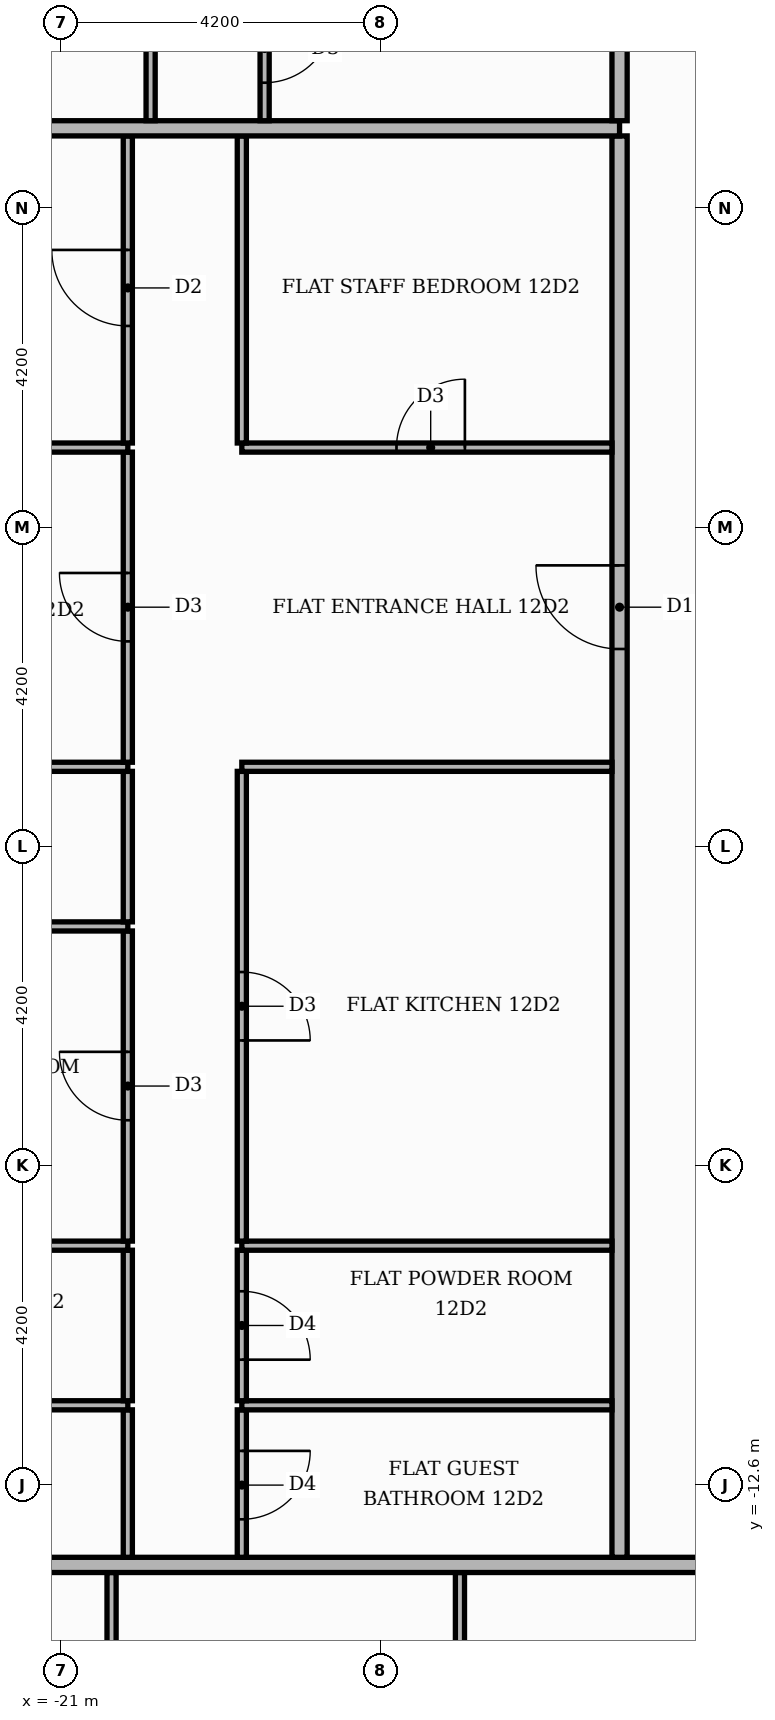
"""IFC4 building model, lengths in metres.
Left out: names, types, materials, properties, quantities, classifications, styles, units other than length and angle.
Written with IfcOpenShell. Run it as: python <this file> out.ifc"""

import sys

from ifc_helpers import new_model, si_unit, direction, frame, frame_2d, origin, place, context, subcontext, project, spatial, rectangle, extrude, element, fill, save


model = new_model("IFC4")
c1 = context("Model", 3, precision=1e-05, world=origin(), true_north=direction((0.0, 1.0)))
c2 = subcontext(c1, "Body", "Model", "MODEL_VIEW")
j1 = project(units=[si_unit("LENGTHUNIT", "METRE"), si_unit("PLANEANGLEUNIT", "RADIAN")], contexts=[c1])
p1 = place(None, origin())
s1 = spatial("IfcSite", under=j1, at=p1, CompositionType="ELEMENT")
p2 = place(p1, origin())
s2 = spatial("IfcBuilding", under=s1, at=p2, CompositionType="ELEMENT")
p3 = place(p2, frame((0.0, 0.0, 54.3)))
s3 = spatial("IfcBuildingStorey", under=s2, at=p3, CompositionType="ELEMENT", Elevation=54.3)
p4 = place(p3, frame((-20.334, -20.66, 0.0), z_axis=(0.0, 0.0, 1.0), x_axis=(0.0, 1.0, 0.0)))
e1 = element("IfcWall", 1, at=p4, inside=s3, PredefinedType="PARTITIONING", context=c2, shape_type="SweptSolid", body=[
    extrude(rectangle(XDim=6.91, YDim=0.12, at=frame_2d((3.455, 0.0))), origin(), (0.0, 0.0, 1.0), 3.48),
])
p5 = place(p4, frame((4.792, 0.0, 0.0)))
e2 = element("IfcOpeningElement", 2, at=p5, cuts=e1, PredefinedType="OPENING", context=c2, shape_type="SweptSolid", body=[
    extrude(rectangle(XDim=0.9, YDim=2.1, at=frame_2d((0.45, 1.05))), frame((0.0, 0.07, 0.0), z_axis=(0.0, -1.0, 0.0), x_axis=(1.0, 0.0, 0.0)), (0.0, 0.0, 1.0), 0.14),
])
p6 = place(p3, frame((-15.75, -20.66, 0.0), z_axis=(0.0, 0.0, 1.0), x_axis=(0.0, 1.0, 0.0)))
e3 = element("IfcWall", 3, at=p6, inside=s3, PredefinedType="PARTITIONING", context=c2, shape_type="SweptSolid", body=[
    extrude(rectangle(XDim=6.91, YDim=0.12, at=frame_2d((3.455, 0.0))), origin(), (0.0, 0.0, 1.0), 3.48),
])
p7 = place(p6, frame((2.975, 0.0, 0.0)))
e4 = element("IfcOpeningElement", 4, at=p7, cuts=e3, PredefinedType="OPENING", context=c2, shape_type="SweptSolid", body=[
    extrude(rectangle(XDim=1.0, YDim=2.1, at=frame_2d((0.5, 1.05))), frame((0.0, 0.07, 0.0), z_axis=(0.0, -1.0, 0.0), x_axis=(1.0, 0.0, 0.0)), (0.0, 0.0, 1.0), 0.14),
])
p8 = place(p3, frame((-25.42, -13.65, 0.0), z_axis=(0.0, 0.0, 1.0), x_axis=(1.0, 0.0, 0.0)))
e5 = element("IfcWall", 5, at=p8, inside=s3, PredefinedType="PARTITIONING", context=c2, shape_type="SweptSolid", body=[
    extrude(rectangle(XDim=39.07, YDim=0.2, at=frame_2d((19.535, 0.0))), origin(), (0.0, 0.0, 1.0), 3.48),
])
p9 = place(p8, frame((13.32, 0.0, 0.0)))
e6 = element("IfcOpeningElement", 6, at=p9, cuts=e5, PredefinedType="OPENING", context=c2, shape_type="SweptSolid", body=[
    extrude(rectangle(XDim=1.1, YDim=2.4, at=frame_2d((0.55, 1.2))), frame((0.0, 0.11, 0.0), z_axis=(0.0, -1.0, 0.0), x_axis=(1.0, 0.0, 0.0)), (0.0, 0.0, 1.0), 0.22),
])
p10 = place(p8, frame((25.92, 0.0, 0.0)))
e7 = element("IfcOpeningElement", 7, at=p10, cuts=e5, PredefinedType="OPENING", context=c2, shape_type="SweptSolid", body=[
    extrude(rectangle(XDim=1.1, YDim=2.4, at=frame_2d((0.55, 1.2))), frame((0.0, 0.11, 0.0), z_axis=(0.0, -1.0, 0.0), x_axis=(1.0, 0.0, 0.0)), (0.0, 0.0, 1.0), 0.22),
])
p11 = place(p3, frame((-20.12, -13.55, 0.0), z_axis=(0.0, 0.0, 1.0), x_axis=(0.0, 1.0, 0.0)))
e8 = element("IfcWall", 8, at=p11, inside=s3, PredefinedType="PARTITIONING", context=c2, shape_type="SweptSolid", body=[
    extrude(rectangle(XDim=1.94, YDim=0.12, at=frame_2d((0.97, 0.0))), origin(), (0.0, 0.0, 1.0), 3.48),
])
p12 = place(p3, frame((-18.62, -13.55, 0.0), z_axis=(0.0, 0.0, 1.0), x_axis=(0.0, 1.0, 0.0)))
e9 = element("IfcWall", 9, at=p12, inside=s3, PredefinedType="PARTITIONING", context=c2, shape_type="SweptSolid", body=[
    extrude(rectangle(XDim=1.94, YDim=0.12, at=frame_2d((0.97, 0.0))), origin(), (0.0, 0.0, 1.0), 3.48),
])
p13 = place(p12, frame((0.5, 0.0, 0.0)))
e10 = element("IfcOpeningElement", 10, at=p13, cuts=e9, PredefinedType="OPENING", context=c2, shape_type="SweptSolid", body=[
    extrude(rectangle(XDim=0.9, YDim=2.1, at=frame_2d((0.45, 1.05))), frame((0.0, 0.07, 0.0), z_axis=(0.0, -1.0, 0.0), x_axis=(1.0, 0.0, 0.0)), (0.0, 0.0, 1.0), 0.14),
])
p14 = place(p3, frame((-13.65, -13.55, 0.0), z_axis=(0.0, 0.0, 1.0), x_axis=(0.0, 1.0, 0.0)))
e11 = element("IfcWall", 11, at=p14, inside=s3, PredefinedType="PARTITIONING", context=c2, shape_type="SweptSolid", body=[
    extrude(rectangle(XDim=18.7, YDim=0.2, at=frame_2d((9.35, 0.0))), origin(), (0.0, 0.0, 1.0), 3.48),
])
p15 = place(p14, frame((11.95, 0.0, 0.0)))
e12 = element("IfcOpeningElement", 12, at=p15, cuts=e11, PredefinedType="OPENING", context=c2, shape_type="SweptSolid", body=[
    extrude(rectangle(XDim=1.1, YDim=2.4, at=frame_2d((0.55, 1.2))), frame((0.0, 0.11, 0.0), z_axis=(0.0, -1.0, 0.0), x_axis=(1.0, 0.0, 0.0)), (0.0, 0.0, 1.0), 0.22),
])
p16 = place(p3, frame((-25.42, -11.55, 0.0), z_axis=(0.0, 0.0, 1.0), x_axis=(1.0, 0.0, 0.0)))
e13 = element("IfcWall", 13, at=p16, inside=s3, PredefinedType="PARTITIONING", context=c2, shape_type="SweptSolid", body=[
    extrude(rectangle(XDim=5.3, YDim=0.12, at=frame_2d((2.65, 0.0))), origin(), (0.0, 0.0, 1.0), 3.48),
])
p17 = place(p16, frame((2.05, 0.0, 0.0)))
e14 = element("IfcOpeningElement", 14, at=p17, cuts=e13, PredefinedType="OPENING", context=c2, shape_type="SweptSolid", body=[
    extrude(rectangle(XDim=0.9, YDim=2.1, at=frame_2d((0.45, 1.05))), frame((0.0, 0.07, 0.0), z_axis=(0.0, -1.0, 0.0), x_axis=(1.0, 0.0, 0.0)), (0.0, 0.0, 1.0), 0.14),
])
p18 = place(p3, frame((-18.62, -11.55, 0.0), z_axis=(0.0, 0.0, 1.0), x_axis=(1.0, 0.0, 0.0)))
e15 = element("IfcWall", 15, at=p18, inside=s3, PredefinedType="PARTITIONING", context=c2, shape_type="SweptSolid", body=[
    extrude(rectangle(XDim=4.87, YDim=0.12, at=frame_2d((2.435, 0.0))), origin(), (0.0, 0.0, 1.0), 3.48),
])
p19 = place(p3, frame((-20.12, -11.49, 0.0), z_axis=(0.0, 0.0, 1.0), x_axis=(0.0, 1.0, 0.0)))
e16 = element("IfcWall", 16, at=p19, inside=s3, PredefinedType="PARTITIONING", context=c2, shape_type="SweptSolid", body=[
    extrude(rectangle(XDim=1.98, YDim=0.12, at=frame_2d((0.99, 0.0))), origin(), (0.0, 0.0, 1.0), 3.48),
])
p20 = place(p3, frame((-18.62, -11.49, 0.0), z_axis=(0.0, 0.0, 1.0), x_axis=(0.0, 1.0, 0.0)))
e17 = element("IfcWall", 17, at=p20, inside=s3, PredefinedType="PARTITIONING", context=c2, shape_type="SweptSolid", body=[
    extrude(rectangle(XDim=1.98, YDim=0.12, at=frame_2d((0.99, 0.0))), origin(), (0.0, 0.0, 1.0), 3.48),
])
p21 = place(p20, frame((0.54, 0.0, 0.0)))
e18 = element("IfcOpeningElement", 18, at=p21, cuts=e17, PredefinedType="OPENING", context=c2, shape_type="SweptSolid", body=[
    extrude(rectangle(XDim=0.9, YDim=2.1, at=frame_2d((0.45, 1.05))), frame((0.0, 0.07, 0.0), z_axis=(0.0, -1.0, 0.0), x_axis=(1.0, 0.0, 0.0)), (0.0, 0.0, 1.0), 0.14),
])
p22 = place(p3, frame((-25.42, -9.45, 0.0), z_axis=(0.0, 0.0, 1.0), x_axis=(1.0, 0.0, 0.0)))
e19 = element("IfcWall", 19, at=p22, inside=s3, PredefinedType="PARTITIONING", context=c2, shape_type="SweptSolid", body=[
    extrude(rectangle(XDim=5.3, YDim=0.12, at=frame_2d((2.65, 0.0))), origin(), (0.0, 0.0, 1.0), 3.48),
])
p23 = place(p22, frame((2.05, 0.0, 0.0)))
e20 = element("IfcOpeningElement", 20, at=p23, cuts=e19, PredefinedType="OPENING", context=c2, shape_type="SweptSolid", body=[
    extrude(rectangle(XDim=0.9, YDim=2.1, at=frame_2d((0.45, 1.05))), frame((0.0, 0.07, 0.0), z_axis=(0.0, -1.0, 0.0), x_axis=(1.0, 0.0, 0.0)), (0.0, 0.0, 1.0), 0.14),
])
p24 = place(p3, frame((-18.62, -9.45, 0.0), z_axis=(0.0, 0.0, 1.0), x_axis=(1.0, 0.0, 0.0)))
e21 = element("IfcWall", 21, at=p24, inside=s3, PredefinedType="PARTITIONING", context=c2, shape_type="SweptSolid", body=[
    extrude(rectangle(XDim=4.87, YDim=0.12, at=frame_2d((2.435, 0.0))), origin(), (0.0, 0.0, 1.0), 3.48),
])
p25 = place(p3, frame((-20.12, -9.39, 0.0), z_axis=(0.0, 0.0, 1.0), x_axis=(0.0, 1.0, 0.0)))
e22 = element("IfcWall", 22, at=p25, inside=s3, PredefinedType="PARTITIONING", context=c2, shape_type="SweptSolid", body=[
    extrude(rectangle(XDim=4.08, YDim=0.12, at=frame_2d((2.04, 0.0))), origin(), (0.0, 0.0, 1.0), 3.48),
])
p26 = place(p25, frame((1.59, 0.0, 0.0)))
e23 = element("IfcOpeningElement", 23, at=p26, cuts=e22, PredefinedType="OPENING", context=c2, shape_type="SweptSolid", body=[
    extrude(rectangle(XDim=0.9, YDim=2.1, at=frame_2d((0.45, 1.05))), frame((0.0, 0.07, 0.0), z_axis=(0.0, -1.0, 0.0), x_axis=(1.0, 0.0, 0.0)), (0.0, 0.0, 1.0), 0.14),
])
p27 = place(p3, frame((-18.62, -9.39, 0.0), z_axis=(0.0, 0.0, 1.0), x_axis=(0.0, 1.0, 0.0)))
e24 = element("IfcWall", 24, at=p27, inside=s3, PredefinedType="PARTITIONING", context=c2, shape_type="SweptSolid", body=[
    extrude(rectangle(XDim=6.18, YDim=0.12, at=frame_2d((3.09, 0.0))), origin(), (0.0, 0.0, 1.0), 3.48),
])
p28 = place(p27, frame((2.64, 0.0, 0.0)))
e25 = element("IfcOpeningElement", 25, at=p28, cuts=e24, PredefinedType="OPENING", context=c2, shape_type="SweptSolid", body=[
    extrude(rectangle(XDim=0.9, YDim=2.1, at=frame_2d((0.45, 1.05))), frame((0.0, 0.07, 0.0), z_axis=(0.0, -1.0, 0.0), x_axis=(1.0, 0.0, 0.0)), (0.0, 0.0, 1.0), 0.14),
])
p29 = place(p3, frame((-25.42, -5.25, 0.0), z_axis=(0.0, 0.0, 1.0), x_axis=(1.0, 0.0, 0.0)))
e26 = element("IfcWall", 26, at=p29, inside=s3, PredefinedType="PARTITIONING", context=c2, shape_type="SweptSolid", body=[
    extrude(rectangle(XDim=5.3, YDim=0.12, at=frame_2d((2.65, 0.0))), origin(), (0.0, 0.0, 1.0), 3.48),
])
p30 = place(p3, frame((-20.12, -5.19, 0.0), z_axis=(0.0, 0.0, 1.0), x_axis=(0.0, 1.0, 0.0)))
e27 = element("IfcWall", 27, at=p30, inside=s3, PredefinedType="PARTITIONING", context=c2, shape_type="SweptSolid", body=[
    extrude(rectangle(XDim=1.98, YDim=0.12, at=frame_2d((0.99, 0.0))), origin(), (0.0, 0.0, 1.0), 3.48),
])
p31 = place(p3, frame((-25.42, -3.15, 0.0), z_axis=(0.0, 0.0, 1.0), x_axis=(1.0, 0.0, 0.0)))
e28 = element("IfcWall", 28, at=p31, inside=s3, PredefinedType="PARTITIONING", context=c2, shape_type="SweptSolid", body=[
    extrude(rectangle(XDim=5.3, YDim=0.12, at=frame_2d((2.65, 0.0))), origin(), (0.0, 0.0, 1.0), 3.48),
])
p32 = place(p31, frame((2.05, 0.0, 0.0)))
e29 = element("IfcOpeningElement", 29, at=p32, cuts=e28, PredefinedType="OPENING", context=c2, shape_type="SweptSolid", body=[
    extrude(rectangle(XDim=0.9, YDim=2.1, at=frame_2d((0.45, 1.05))), frame((0.0, 0.07, 0.0), z_axis=(0.0, -1.0, 0.0), x_axis=(1.0, 0.0, 0.0)), (0.0, 0.0, 1.0), 0.14),
])
p33 = place(p3, frame((-18.62, -3.15, 0.0), z_axis=(0.0, 0.0, 1.0), x_axis=(1.0, 0.0, 0.0)))
e30 = element("IfcWall", 30, at=p33, inside=s3, PredefinedType="PARTITIONING", context=c2, shape_type="SweptSolid", body=[
    extrude(rectangle(XDim=4.87, YDim=0.12, at=frame_2d((2.435, 0.0))), origin(), (0.0, 0.0, 1.0), 3.48),
])
p34 = place(p3, frame((-20.12, -3.09, 0.0), z_axis=(0.0, 0.0, 1.0), x_axis=(0.0, 1.0, 0.0)))
e31 = element("IfcWall", 31, at=p34, inside=s3, PredefinedType="PARTITIONING", context=c2, shape_type="SweptSolid", body=[
    extrude(rectangle(XDim=4.08, YDim=0.12, at=frame_2d((2.04, 0.0))), origin(), (0.0, 0.0, 1.0), 3.48),
])
p35 = place(p34, frame((1.59, 0.0, 0.0)))
e32 = element("IfcOpeningElement", 32, at=p35, cuts=e31, PredefinedType="OPENING", context=c2, shape_type="SweptSolid", body=[
    extrude(rectangle(XDim=0.9, YDim=2.1, at=frame_2d((0.45, 1.05))), frame((0.0, 0.07, 0.0), z_axis=(0.0, -1.0, 0.0), x_axis=(1.0, 0.0, 0.0)), (0.0, 0.0, 1.0), 0.14),
])
p36 = place(p3, frame((-25.42, 1.05, 0.0), z_axis=(0.0, 0.0, 1.0), x_axis=(1.0, 0.0, 0.0)))
e33 = element("IfcWall", 33, at=p36, inside=s3, PredefinedType="PARTITIONING", context=c2, shape_type="SweptSolid", body=[
    extrude(rectangle(XDim=5.3, YDim=0.12, at=frame_2d((2.65, 0.0))), origin(), (0.0, 0.0, 1.0), 3.48),
])
p37 = place(p3, frame((-18.62, 1.05, 0.0), z_axis=(0.0, 0.0, 1.0), x_axis=(1.0, 0.0, 0.0)))
e34 = element("IfcWall", 34, at=p37, inside=s3, PredefinedType="PARTITIONING", context=c2, shape_type="SweptSolid", body=[
    extrude(rectangle(XDim=4.87, YDim=0.12, at=frame_2d((2.435, 0.0))), origin(), (0.0, 0.0, 1.0), 3.48),
])
p38 = place(p37, frame((2.035, 0.0, 0.0)))
e35 = element("IfcOpeningElement", 35, at=p38, cuts=e34, PredefinedType="OPENING", context=c2, shape_type="SweptSolid", body=[
    extrude(rectangle(XDim=0.9, YDim=2.1, at=frame_2d((0.45, 1.05))), frame((0.0, 0.07, 0.0), z_axis=(0.0, -1.0, 0.0), x_axis=(1.0, 0.0, 0.0)), (0.0, 0.0, 1.0), 0.14),
])
p39 = place(p3, frame((-20.12, 1.11, 0.0), z_axis=(0.0, 0.0, 1.0), x_axis=(0.0, 1.0, 0.0)))
e36 = element("IfcWall", 36, at=p39, inside=s3, PredefinedType="PARTITIONING", context=c2, shape_type="SweptSolid", body=[
    extrude(rectangle(XDim=4.04, YDim=0.12, at=frame_2d((2.02, 0.0))), origin(), (0.0, 0.0, 1.0), 3.48),
])
p40 = place(p39, frame((1.54, 0.0, 0.0)))
e37 = element("IfcOpeningElement", 37, at=p40, cuts=e36, PredefinedType="OPENING", context=c2, shape_type="SweptSolid", body=[
    extrude(rectangle(XDim=1.0, YDim=2.1, at=frame_2d((0.5, 1.05))), frame((0.0, 0.07, 0.0), z_axis=(0.0, -1.0, 0.0), x_axis=(1.0, 0.0, 0.0)), (0.0, 0.0, 1.0), 0.14),
])
p41 = place(p3, frame((-18.62, 1.11, 0.0), z_axis=(0.0, 0.0, 1.0), x_axis=(0.0, 1.0, 0.0)))
e38 = element("IfcWall", 38, at=p41, inside=s3, PredefinedType="PARTITIONING", context=c2, shape_type="SweptSolid", body=[
    extrude(rectangle(XDim=4.04, YDim=0.12, at=frame_2d((2.02, 0.0))), origin(), (0.0, 0.0, 1.0), 3.48),
])
p42 = place(p3, frame((-25.42, 5.25, 0.0), z_axis=(0.0, 0.0, 1.0), x_axis=(1.0, 0.0, 0.0)))
e39 = element("IfcWall", 39, at=p42, inside=s3, PredefinedType="PARTITIONING", context=c2, shape_type="SweptSolid", body=[
    extrude(rectangle(XDim=11.77, YDim=0.2, at=frame_2d((5.885, 0.0))), origin(), (0.0, 0.0, 1.0), 3.48),
])
p43 = place(p3, frame((-19.82, 5.35, 0.0), z_axis=(0.0, 0.0, 1.0), x_axis=(0.0, 1.0, 0.0)))
e40 = element("IfcWall", 40, at=p43, inside=s3, PredefinedType="PARTITIONING", context=c2, shape_type="SweptSolid", body=[
    extrude(rectangle(XDim=1.94, YDim=0.12, at=frame_2d((0.97, 0.0))), origin(), (0.0, 0.0, 1.0), 3.48),
])
p44 = place(p3, frame((-18.32, 5.35, 0.0), z_axis=(0.0, 0.0, 1.0), x_axis=(0.0, 1.0, 0.0)))
e41 = element("IfcWall", 41, at=p44, inside=s3, PredefinedType="PARTITIONING", context=c2, shape_type="SweptSolid", body=[
    extrude(rectangle(XDim=1.94, YDim=0.12, at=frame_2d((0.97, 0.0))), origin(), (0.0, 0.0, 1.0), 3.48),
])
p45 = place(p44, frame((0.5, 0.0, 0.0)))
e42 = element("IfcOpeningElement", 42, at=p45, cuts=e41, PredefinedType="OPENING", context=c2, shape_type="SweptSolid", body=[
    extrude(rectangle(XDim=0.9, YDim=2.1, at=frame_2d((0.45, 1.05))), frame((0.0, 0.07, 0.0), z_axis=(0.0, -1.0, 0.0), x_axis=(1.0, 0.0, 0.0)), (0.0, 0.0, 1.0), 0.14),
])
p46 = place(p3, frame((-13.65, 5.35, 0.0), z_axis=(0.0, 0.0, 1.0), x_axis=(0.0, 1.0, 0.0)))
e43 = element("IfcWall", 43, at=p46, inside=s3, PredefinedType="PARTITIONING", context=c2, shape_type="SweptSolid", body=[
    extrude(rectangle(XDim=8.2, YDim=0.2, at=frame_2d((4.1, 0.0))), origin(), (0.0, 0.0, 1.0), 3.48),
])
p47 = place(p46, frame((5.65, 0.0, 0.0)))
e44 = element("IfcOpeningElement", 44, at=p47, cuts=e43, PredefinedType="OPENING", context=c2, shape_type="SweptSolid", body=[
    extrude(rectangle(XDim=1.1, YDim=2.4, at=frame_2d((0.55, 1.2))), frame((0.0, 0.11, 0.0), z_axis=(0.0, -1.0, 0.0), x_axis=(1.0, 0.0, 0.0)), (0.0, 0.0, 1.0), 0.22),
])
p48 = place(p45, frame((0.9, 0.0, 0.0), z_axis=(0.0, 0.0, 1.0), x_axis=(-1.0, 0.0, 0.0)))
e45 = element("IfcDoor", 45, at=p48, inside=s3, OperationType="SINGLE_SWING_RIGHT", PredefinedType="DOOR", context=c2, shape_type="SweptSolid", body=[
    extrude(rectangle(XDim=0.9, YDim=2.1, at=frame_2d((0.45, 1.05))), frame((0.0, 0.025, 0.0), z_axis=(0.0, -1.0, 0.0), x_axis=(1.0, 0.0, 0.0)), (0.0, 0.0, 1.0), 0.05),
])
fill(e42, e45)
p49 = place(p15, origin())
e46 = element("IfcDoor", 46, at=p49, inside=s3, OperationType="SINGLE_SWING_RIGHT", PredefinedType="DOOR", context=c2, shape_type="SweptSolid", body=[
    extrude(rectangle(XDim=1.1, YDim=2.4, at=frame_2d((0.55, 1.2))), frame((0.0, 0.025, 0.0), z_axis=(0.0, -1.0, 0.0), x_axis=(1.0, 0.0, 0.0)), (0.0, 0.0, 1.0), 0.05),
])
fill(e12, e46)
p50 = place(p38, origin())
e47 = element("IfcDoor", 47, at=p50, inside=s3, OperationType="SINGLE_SWING_RIGHT", PredefinedType="DOOR", context=c2, shape_type="SweptSolid", body=[
    extrude(rectangle(XDim=0.9, YDim=2.1, at=frame_2d((0.45, 1.05))), frame((0.0, 0.025, 0.0), z_axis=(0.0, -1.0, 0.0), x_axis=(1.0, 0.0, 0.0)), (0.0, 0.0, 1.0), 0.05),
])
fill(e35, e47)
p51 = place(p28, frame((0.9, 0.0, 0.0), z_axis=(0.0, 0.0, 1.0), x_axis=(-1.0, 0.0, 0.0)))
e48 = element("IfcDoor", 48, at=p51, inside=s3, OperationType="SINGLE_SWING_LEFT", PredefinedType="DOOR", context=c2, shape_type="SweptSolid", body=[
    extrude(rectangle(XDim=0.9, YDim=2.1, at=frame_2d((0.45, 1.05))), frame((0.0, 0.025, 0.0), z_axis=(0.0, -1.0, 0.0), x_axis=(1.0, 0.0, 0.0)), (0.0, 0.0, 1.0), 0.05),
])
fill(e25, e48)
p52 = place(p21, frame((0.9, 0.0, 0.0), z_axis=(0.0, 0.0, 1.0), x_axis=(-1.0, 0.0, 0.0)))
e49 = element("IfcDoor", 49, at=p52, inside=s3, OperationType="SINGLE_SWING_LEFT", PredefinedType="DOOR", context=c2, shape_type="SweptSolid", body=[
    extrude(rectangle(XDim=0.9, YDim=2.1, at=frame_2d((0.45, 1.05))), frame((0.0, 0.025, 0.0), z_axis=(0.0, -1.0, 0.0), x_axis=(1.0, 0.0, 0.0)), (0.0, 0.0, 1.0), 0.05),
])
fill(e18, e49)
p53 = place(p13, frame((0.9, 0.0, 0.0), z_axis=(0.0, 0.0, 1.0), x_axis=(-1.0, 0.0, 0.0)))
e50 = element("IfcDoor", 50, at=p53, inside=s3, OperationType="SINGLE_SWING_RIGHT", PredefinedType="DOOR", context=c2, shape_type="SweptSolid", body=[
    extrude(rectangle(XDim=0.9, YDim=2.1, at=frame_2d((0.45, 1.05))), frame((0.0, 0.025, 0.0), z_axis=(0.0, -1.0, 0.0), x_axis=(1.0, 0.0, 0.0)), (0.0, 0.0, 1.0), 0.05),
])
fill(e10, e50)
p54 = place(p40, origin())
e51 = element("IfcDoor", 51, at=p54, inside=s3, OperationType="SINGLE_SWING_RIGHT", PredefinedType="DOOR", context=c2, shape_type="SweptSolid", body=[
    extrude(rectangle(XDim=1.0, YDim=2.1, at=frame_2d((0.5, 1.05))), frame((0.0, 0.025, 0.0), z_axis=(0.0, -1.0, 0.0), x_axis=(1.0, 0.0, 0.0)), (0.0, 0.0, 1.0), 0.05),
])
fill(e37, e51)
p55 = place(p35, origin())
e52 = element("IfcDoor", 52, at=p55, inside=s3, OperationType="SINGLE_SWING_RIGHT", PredefinedType="DOOR", context=c2, shape_type="SweptSolid", body=[
    extrude(rectangle(XDim=0.9, YDim=2.1, at=frame_2d((0.45, 1.05))), frame((0.0, 0.025, 0.0), z_axis=(0.0, -1.0, 0.0), x_axis=(1.0, 0.0, 0.0)), (0.0, 0.0, 1.0), 0.05),
])
fill(e32, e52)
p56 = place(p26, origin())
e53 = element("IfcDoor", 53, at=p56, inside=s3, OperationType="SINGLE_SWING_RIGHT", PredefinedType="DOOR", context=c2, shape_type="SweptSolid", body=[
    extrude(rectangle(XDim=0.9, YDim=2.1, at=frame_2d((0.45, 1.05))), frame((0.0, 0.025, 0.0), z_axis=(0.0, -1.0, 0.0), x_axis=(1.0, 0.0, 0.0)), (0.0, 0.0, 1.0), 0.05),
])
fill(e23, e53)
save(model, sys.argv[1])
